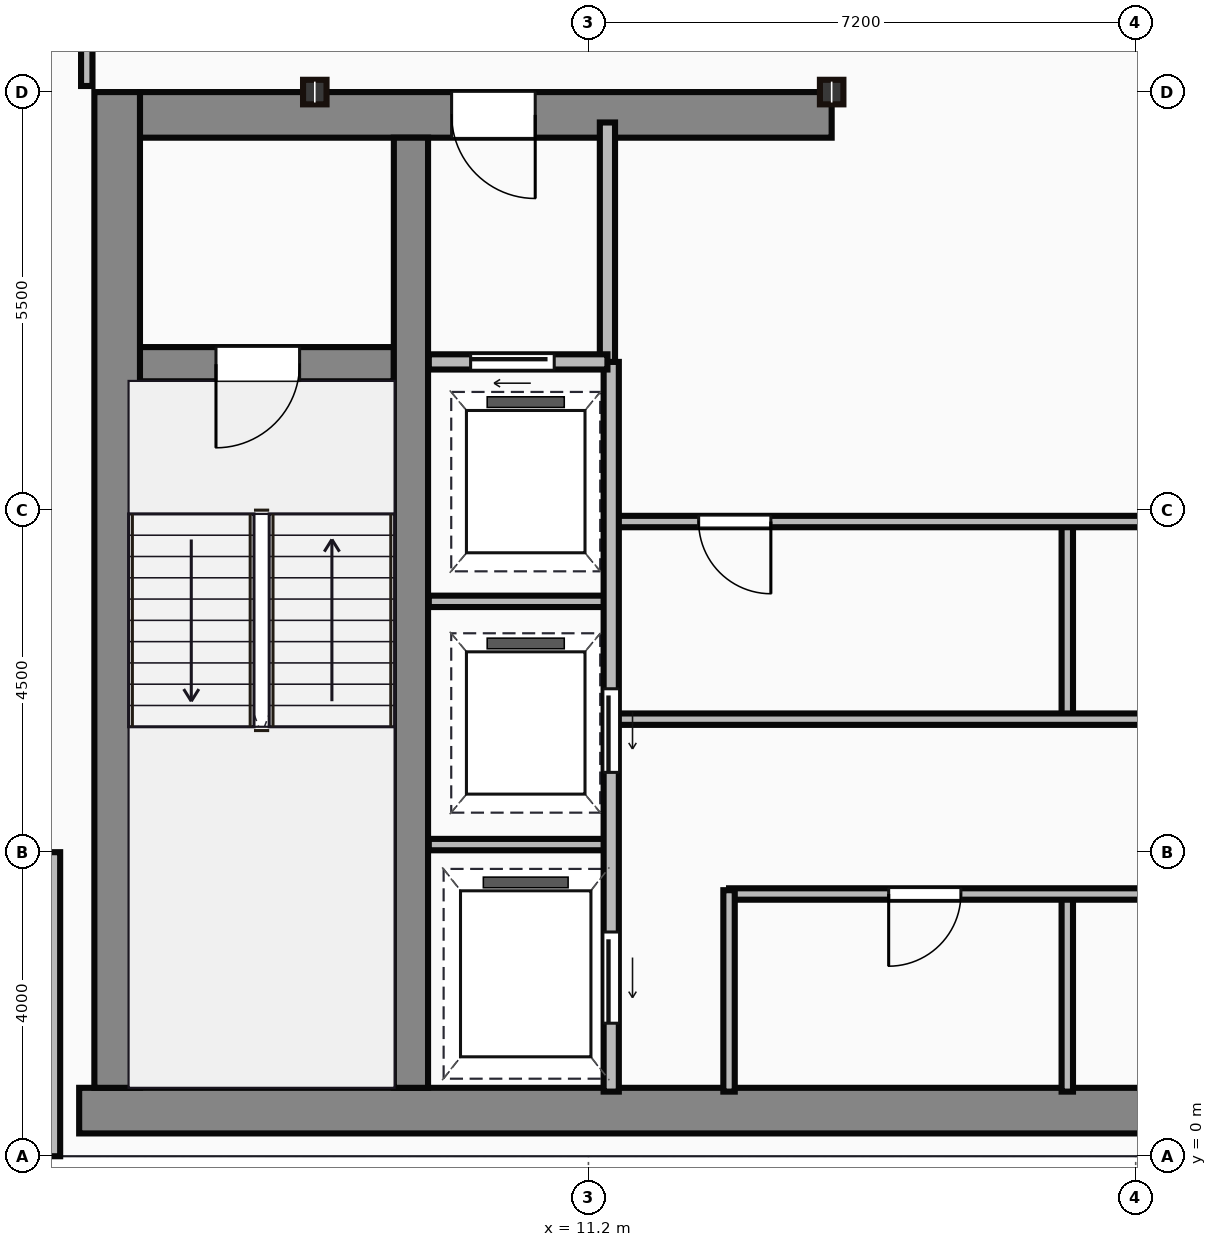
"""IFC4 building model, lengths in metres.
Left out: names, types, materials, properties, quantities, classifications, styles, units other than length and angle.
Written with IfcOpenShell. Run it as: python <this file> out.ifc"""

import sys

from ifc_helpers import new_model, si_unit, direction, frame, frame_2d, origin, origin_2d, place, context, subcontext, project, spatial, rectangle, i_section, extrude, source, transform, mapped, element, fill, save


model = new_model("IFC4")
c1 = context("Model", 3, precision=1e-05, world=origin(), true_north=direction((0.0, 1.0)))
c2 = subcontext(c1, "Body", "Model", "MODEL_VIEW")
j1 = project(units=[si_unit("LENGTHUNIT", "METRE"), si_unit("PLANEANGLEUNIT", "RADIAN")], contexts=[c1])
p1 = place(None, origin())
s1 = spatial("IfcSite", under=j1, at=p1, CompositionType="ELEMENT")
p2 = place(p1, origin())
s2 = spatial("IfcBuilding", under=s1, at=p2, CompositionType="ELEMENT")
p3 = place(p2, frame((0.0, 0.0, 266.1)))
s3 = spatial("IfcBuildingStorey", under=s2, at=p3, CompositionType="ELEMENT", Elevation=266.1)
m1 = source(origin(), c2, "Body", "SweptSolid", [
    extrude(rectangle(XDim=29.5, YDim=0.6, at=frame_2d((14.75, 0.0))), origin(), (0.0, 0.0, 1.0), 3.65),
])
p4 = place(p3, frame((4.5, 0.6, 0.0), z_axis=(0.0, 0.0, 1.0), x_axis=(1.0, 0.0, 0.0)))
e1 = element("IfcWall", 1, at=p4, inside=s3, PredefinedType="SHEAR", context=c2, shape_type="MappedRepresentation", body=[
    mapped(m1, transform((0.0, 0.0, 0.0))),
])
m2 = source(origin(), c2, "Body", "SweptSolid", [
    extrude(rectangle(XDim=13.1, YDim=0.6, at=frame_2d((6.55, 0.0))), origin(), (0.0, 0.0, 1.0), 3.65),
])
p5 = place(p3, frame((5.0, 0.9, 0.0), z_axis=(0.0, 0.0, 1.0), x_axis=(0.0, 1.0, 0.0)))
e2 = element("IfcWall", 2, at=p5, inside=s3, PredefinedType="SHEAR", context=c2, shape_type="MappedRepresentation", body=[
    mapped(m2, transform((0.0, 0.0, 0.0))),
])
m3 = source(origin(), c2, "Body", "SweptSolid", [
    extrude(rectangle(XDim=9.1, YDim=0.6, at=frame_2d((4.55, 0.0))), origin(), (0.0, 0.0, 1.0), 3.65),
])
p6 = place(p3, frame((5.3, 13.7, 0.0), z_axis=(0.0, 0.0, 1.0), x_axis=(1.0, 0.0, 0.0)))
e3 = element("IfcWall", 3, at=p6, inside=s3, PredefinedType="SHEAR", context=c2, shape_type="MappedRepresentation", body=[
    mapped(m3, transform((0.0, 0.0, 0.0))),
])
p7 = place(p6, frame((4.1, 0.0, 0.0)))
e4 = element("IfcOpeningElement", 4, at=p7, cuts=e3, PredefinedType="OPENING", context=c2, shape_type="SweptSolid", body=[
    extrude(rectangle(XDim=1.1, YDim=2.15, at=frame_2d((0.55, 1.075))), frame((0.0, 0.31, 0.0), z_axis=(0.0, -1.0, 0.0), x_axis=(1.0, 0.0, 0.0)), (0.0, 0.0, 1.0), 0.62),
])
m4 = source(origin(), c2, "Body", "SweptSolid", [
    extrude(rectangle(XDim=12.5, YDim=0.45, at=frame_2d((6.25, 0.0))), origin(), (0.0, 0.0, 1.0), 3.65),
])
p8 = place(p3, frame((8.865, 0.9, 0.0), z_axis=(0.0, 0.0, 1.0), x_axis=(0.0, 1.0, 0.0)))
e5 = element("IfcWall", 5, at=p8, inside=s3, PredefinedType="SHEAR", context=c2, shape_type="MappedRepresentation", body=[
    mapped(m4, transform((0.0, 0.0, 0.0))),
])
m5 = source(origin(), c2, "Body", "SweptSolid", [
    extrude(rectangle(XDim=3.39, YDim=0.45, at=frame_2d((1.695, 0.0))), origin(), (0.0, 0.0, 1.0), 3.65),
])
p9 = place(p3, frame((5.25, 10.42, 0.0), z_axis=(0.0, 0.0, 1.0), x_axis=(1.0, 0.0, 0.0)))
e6 = element("IfcWall", 6, at=p9, inside=s3, PredefinedType="SHEAR", context=c2, shape_type="MappedRepresentation", body=[
    mapped(m5, transform((0.0, 0.0, 0.0))),
])
p10 = place(p9, frame((1.05, 0.0, 0.0)))
e7 = element("IfcOpeningElement", 7, at=p10, cuts=e6, PredefinedType="OPENING", context=c2, shape_type="SweptSolid", body=[
    extrude(rectangle(XDim=1.1, YDim=2.15, at=frame_2d((0.55, 1.075))), frame((0.0, 0.235, 0.0), z_axis=(0.0, -1.0, 0.0), x_axis=(1.0, 0.0, 0.0)), (0.0, 0.0, 1.0), 0.47),
])
m6 = source(origin(), c2, "Body", "SweptSolid", [
    extrude(i_section(OverallWidth=0.309, OverallDepth=0.323, WebThickness=0.014, FlangeThickness=0.023, at=origin_2d()), origin(), (0.0, 0.0, 1.0), 3.65),
])
for number, where, z_axis, x_axis in (
    (8, (7.6, 14.0, 0.0), (0.0, 0.0, 1.0), (1.0, 0.0, 0.0)),
    (9, (14.4, 14.0, 0.0), (0.0, 0.0, 1.0), (1.0, 0.0, 0.0)),
):
    element("IfcColumn", number, at=place(p3, frame(where, z_axis=z_axis, x_axis=x_axis)), inside=s3, PredefinedType="COLUMN", context=c2, shape_type="MappedRepresentation", body=[
        mapped(m6, transform((0.0, 0.0, 0.0))),
    ])
m7 = source(origin(), c2, "Body", "SweptSolid", [
    extrude(rectangle(XDim=4.0, YDim=0.25, at=frame_2d((2.0, 0.0))), origin(), (0.0, 0.0, 1.0), 3.4),
])
p11 = place(p3, frame((4.125, 4.0, 0.0), z_axis=(0.0, 0.0, 1.0), x_axis=(0.0, -1.0, 0.0)))
e10 = element("IfcWall", 10, at=p11, inside=s3, PredefinedType="STANDARD", context=c2, shape_type="MappedRepresentation", body=[
    mapped(m7, transform((0.0, 0.0, 0.0))),
])
m8 = source(origin(), c2, "Body", "SweptSolid", [
    extrude(rectangle(XDim=3.18, YDim=0.2, at=frame_2d((1.59, 0.0))), origin(), (0.0, 0.0, 1.0), 3.4),
])
p12 = place(p3, frame((11.45, 10.42, 0.0), z_axis=(0.0, 0.0, 1.0), x_axis=(0.0, 1.0, 0.0)))
e11 = element("IfcWall", 11, at=p12, inside=s3, PredefinedType="PARTITIONING", context=c2, shape_type="MappedRepresentation", body=[
    mapped(m8, transform((0.0, 0.0, 0.0))),
])
m9 = source(origin(), c2, "Body", "SweptSolid", [
    extrude(rectangle(XDim=2.35, YDim=0.2, at=frame_2d((1.175, 0.0))), origin(), (0.0, 0.0, 1.0), 3.4),
])
p13 = place(p3, frame((9.1, 10.45, 0.0), z_axis=(0.0, 0.0, 1.0), x_axis=(1.0, 0.0, 0.0)))
e12 = element("IfcWall", 12, at=p13, inside=s3, PredefinedType="PARTITIONING", context=c2, shape_type="MappedRepresentation", body=[
    mapped(m9, transform((0.0, 0.0, 0.0))),
])
p14 = place(p13, frame((0.55, 0.0, 0.0)))
e13 = element("IfcOpeningElement", 13, at=p14, cuts=e12, PredefinedType="OPENING", context=c2, shape_type="SweptSolid", body=[
    extrude(rectangle(XDim=1.1, YDim=2.15, at=frame_2d((0.55, 1.075))), frame((0.0, 0.11, 0.0), z_axis=(0.0, -1.0, 0.0), x_axis=(1.0, 0.0, 0.0)), (0.0, 0.0, 1.0), 0.22),
])
m10 = source(origin(), c2, "Body", "SweptSolid", [
    extrude(rectangle(XDim=9.6, YDim=0.2, at=frame_2d((4.8, 0.0))), origin(), (0.0, 0.0, 1.0), 3.4),
])
p15 = place(p3, frame((11.5, 0.85, 0.0), z_axis=(0.0, 0.0, 1.0), x_axis=(0.0, 1.0, 0.0)))
e14 = element("IfcWall", 14, at=p15, inside=s3, PredefinedType="PARTITIONING", context=c2, shape_type="MappedRepresentation", body=[
    mapped(m10, transform((0.0, 0.0, 0.0))),
])
p16 = place(p15, frame((4.2, 0.0, 0.0)))
e15 = element("IfcOpeningElement", 15, at=p16, cuts=e14, PredefinedType="OPENING", context=c2, shape_type="SweptSolid", body=[
    extrude(rectangle(XDim=1.1, YDim=2.15, at=frame_2d((0.55, 1.075))), frame((0.0, 0.11, 0.0), z_axis=(0.0, -1.0, 0.0), x_axis=(1.0, 0.0, 0.0)), (0.0, 0.0, 1.0), 0.22),
])
p17 = place(p15, frame((0.9, 0.0, 0.0)))
e16 = element("IfcOpeningElement", 16, at=p17, cuts=e14, PredefinedType="OPENING", context=c2, shape_type="SweptSolid", body=[
    extrude(rectangle(XDim=1.2, YDim=2.15, at=frame_2d((0.6, 1.075))), frame((0.0, 0.11, 0.0), z_axis=(0.0, -1.0, 0.0), x_axis=(1.0, 0.0, 0.0)), (0.0, 0.0, 1.0), 0.22),
])
m11 = source(origin(), c2, "Body", "SweptSolid", [
    extrude(rectangle(XDim=2.4, YDim=0.15, at=frame_2d((1.2, 0.0))), origin(), (0.0, 0.0, 1.0), 3.4),
])
for number, where, z_axis, x_axis in (
    (17, (9.1, 4.1, 0.0), (0.0, 0.0, 1.0), (1.0, 0.0, 0.0)),
    (18, (9.1, 7.3, 0.0), (0.0, 0.0, 1.0), (1.0, 0.0, 0.0)),
):
    element("IfcWall", number, at=place(p3, frame(where, z_axis=z_axis, x_axis=x_axis)), inside=s3, PredefinedType="PARTITIONING", context=c2, shape_type="MappedRepresentation", body=[
        mapped(m11, transform((0.0, 0.0, 0.0))),
    ])
m12 = source(origin(), c2, "Body", "SweptSolid", [
    extrude(rectangle(XDim=2.65, YDim=0.15, at=frame_2d((1.325, 0.0))), origin(), (0.0, 0.0, 1.0), 3.4),
])
p18 = place(p3, frame((13.05, 0.85, 0.0), z_axis=(0.0, 0.0, 1.0), x_axis=(0.0, 1.0, 0.0)))
e19 = element("IfcWall", 19, at=p18, inside=s3, PredefinedType="PARTITIONING", context=c2, shape_type="MappedRepresentation", body=[
    mapped(m12, transform((0.0, 0.0, 0.0))),
])
m13 = source(origin(), c2, "Body", "SweptSolid", [
    extrude(rectangle(XDim=10.35, YDim=0.15, at=frame_2d((5.175, 0.0))), origin(), (0.0, 0.0, 1.0), 3.4),
])
p19 = place(p3, frame((13.05, 3.45, 0.0), z_axis=(0.0, 0.0, 1.0), x_axis=(1.0, 0.0, 0.0)))
e20 = element("IfcWall", 20, at=p19, inside=s3, PredefinedType="PARTITIONING", context=c2, shape_type="MappedRepresentation", body=[
    mapped(m13, transform((0.0, 0.0, 0.0))),
])
p20 = place(p19, frame((2.1, 0.0, 0.0)))
e21 = element("IfcOpeningElement", 21, at=p20, cuts=e20, PredefinedType="OPENING", context=c2, shape_type="SweptSolid", body=[
    extrude(rectangle(XDim=0.95, YDim=2.15, at=frame_2d((0.475, 1.075))), frame((0.0, 0.085, 0.0), z_axis=(0.0, -1.0, 0.0), x_axis=(1.0, 0.0, 0.0)), (0.0, 0.0, 1.0), 0.17),
])
p21 = place(p19, frame((6.8, 0.0, 0.0)))
e22 = element("IfcOpeningElement", 22, at=p21, cuts=e20, PredefinedType="OPENING", context=c2, shape_type="SweptSolid", body=[
    extrude(rectangle(XDim=0.95, YDim=2.15, at=frame_2d((0.475, 1.075))), frame((0.0, 0.085, 0.0), z_axis=(0.0, -1.0, 0.0), x_axis=(1.0, 0.0, 0.0)), (0.0, 0.0, 1.0), 0.17),
])
m14 = source(origin(), c2, "Body", "SweptSolid", [
    extrude(rectangle(XDim=2.6, YDim=0.15, at=frame_2d((1.3, 0.0))), origin(), (0.0, 0.0, 1.0), 3.4),
])
p22 = place(p3, frame((17.5, 0.85, 0.0), z_axis=(0.0, 0.0, 1.0), x_axis=(0.0, 1.0, 0.0)))
e23 = element("IfcWall", 23, at=p22, inside=s3, PredefinedType="PARTITIONING", context=c2, shape_type="MappedRepresentation", body=[
    mapped(m14, transform((0.0, 0.0, 0.0))),
])
m15 = source(origin(), c2, "Body", "SweptSolid", [
    extrude(rectangle(XDim=11.85, YDim=0.15, at=frame_2d((5.925, 0.0))), origin(), (0.0, 0.0, 1.0), 3.4),
])
p23 = place(p3, frame((11.55, 5.75, 0.0), z_axis=(0.0, 0.0, 1.0), x_axis=(1.0, 0.0, 0.0)))
e24 = element("IfcWall", 24, at=p23, inside=s3, PredefinedType="PARTITIONING", context=c2, shape_type="MappedRepresentation", body=[
    mapped(m15, transform((0.0, 0.0, 0.0))),
])
p24 = place(p3, frame((11.55, 8.35, 0.0), z_axis=(0.0, 0.0, 1.0), x_axis=(1.0, 0.0, 0.0)))
e25 = element("IfcWall", 25, at=p24, inside=s3, PredefinedType="PARTITIONING", context=c2, shape_type="MappedRepresentation", body=[
    mapped(m15, transform((0.0, 0.0, 0.0))),
])
p25 = place(p24, frame((1.1, 0.0, 0.0)))
e26 = element("IfcOpeningElement", 26, at=p25, cuts=e25, PredefinedType="OPENING", context=c2, shape_type="SweptSolid", body=[
    extrude(rectangle(XDim=0.95, YDim=2.15, at=frame_2d((0.475, 1.075))), frame((0.0, 0.085, 0.0), z_axis=(0.0, -1.0, 0.0), x_axis=(1.0, 0.0, 0.0)), (0.0, 0.0, 1.0), 0.17),
])
p26 = place(p24, frame((9.4, 0.0, 0.0)))
e27 = element("IfcOpeningElement", 27, at=p26, cuts=e25, PredefinedType="OPENING", context=c2, shape_type="SweptSolid", body=[
    extrude(rectangle(XDim=0.95, YDim=2.15, at=frame_2d((0.475, 1.075))), frame((0.0, 0.085, 0.0), z_axis=(0.0, -1.0, 0.0), x_axis=(1.0, 0.0, 0.0)), (0.0, 0.0, 1.0), 0.17),
])
m16 = source(origin(), c2, "Body", "SweptSolid", [
    extrude(rectangle(XDim=2.5, YDim=0.15, at=frame_2d((1.25, 0.0))), origin(), (0.0, 0.0, 1.0), 3.4),
])
p27 = place(p3, frame((17.5, 5.8, 0.0), z_axis=(0.0, 0.0, 1.0), x_axis=(0.0, 1.0, 0.0)))
e28 = element("IfcWall", 28, at=p27, inside=s3, PredefinedType="PARTITIONING", context=c2, shape_type="MappedRepresentation", body=[
    mapped(m16, transform((0.0, 0.0, 0.0))),
])
m17 = source(origin(), c2, "Body", "SweptSolid", [
    extrude(rectangle(XDim=2.12, YDim=0.15, at=frame_2d((1.06, 0.0))), origin(), (0.0, 0.0, 1.0), 3.4),
])
p28 = place(p3, frame((4.6, 14.08, 0.0), z_axis=(0.0, 0.0, 1.0), x_axis=(0.0, 1.0, 0.0)))
e29 = element("IfcWall", 29, at=p28, inside=s3, PredefinedType="PARTITIONING", context=c2, shape_type="MappedRepresentation", body=[
    mapped(m17, transform((0.0, 0.0, 0.0))),
])
m18 = source(origin(), c2, "Body", "SweptSolid", [
    extrude(rectangle(XDim=1.1, YDim=2.15, at=frame_2d((0.55, 1.075))), frame((0.0, 0.025, 0.0), z_axis=(0.0, -1.0, 0.0), x_axis=(1.0, 0.0, 0.0)), (0.0, 0.0, 1.0), 0.05),
])
p29 = place(p10, frame((1.1, 0.0, 0.0), z_axis=(0.0, 0.0, 1.0), x_axis=(-1.0, 0.0, 0.0)))
e30 = element("IfcDoor", 30, at=p29, inside=s3, OperationType="SINGLE_SWING_LEFT", PredefinedType="DOOR", context=c2, shape_type="MappedRepresentation", body=[
    mapped(m18, transform((0.0, 0.0, 0.0))),
])
fill(e7, e30)
p30 = place(p7, origin())
e31 = element("IfcDoor", 31, at=p30, inside=s3, OperationType="SINGLE_SWING_RIGHT", PredefinedType="DOOR", context=c2, shape_type="MappedRepresentation", body=[
    mapped(m18, transform((0.0, 0.0, 0.0))),
])
fill(e4, e31)
p31 = place(p14, origin())
e32 = element("IfcDoor", 32, at=p31, inside=s3, OperationType="SLIDING_TO_LEFT", PredefinedType="DOOR", context=c2, shape_type="MappedRepresentation", body=[
    mapped(m18, transform((0.0, 0.0, 0.0))),
])
fill(e13, e32)
p32 = place(p16, frame((1.1, 0.0, 0.0), z_axis=(0.0, 0.0, 1.0), x_axis=(-1.0, 0.0, 0.0)))
e33 = element("IfcDoor", 33, at=p32, inside=s3, OperationType="SLIDING_TO_LEFT", PredefinedType="DOOR", context=c2, shape_type="MappedRepresentation", body=[
    mapped(m18, transform((0.0, 0.0, 0.0))),
])
fill(e15, e33)
m19 = source(origin(), c2, "Body", "SweptSolid", [
    extrude(rectangle(XDim=1.2, YDim=2.15, at=frame_2d((0.6, 1.075))), frame((0.0, 0.025, 0.0), z_axis=(0.0, -1.0, 0.0), x_axis=(1.0, 0.0, 0.0)), (0.0, 0.0, 1.0), 0.05),
])
p33 = place(p17, frame((1.2, 0.0, 0.0), z_axis=(0.0, 0.0, 1.0), x_axis=(-1.0, 0.0, 0.0)))
e34 = element("IfcDoor", 34, at=p33, inside=s3, OperationType="SLIDING_TO_LEFT", PredefinedType="DOOR", context=c2, shape_type="MappedRepresentation", body=[
    mapped(m19, transform((0.0, 0.0, 0.0))),
])
fill(e16, e34)
m20 = source(origin(), c2, "Body", "SweptSolid", [
    extrude(rectangle(XDim=0.95, YDim=2.15, at=frame_2d((0.475, 1.075))), frame((0.0, 0.025, 0.0), z_axis=(0.0, -1.0, 0.0), x_axis=(1.0, 0.0, 0.0)), (0.0, 0.0, 1.0), 0.05),
])
p34 = place(p20, origin())
e35 = element("IfcDoor", 35, at=p34, inside=s3, OperationType="SINGLE_SWING_LEFT", PredefinedType="DOOR", context=c2, shape_type="MappedRepresentation", body=[
    mapped(m20, transform((0.0, 0.0, 0.0))),
])
fill(e21, e35)
p35 = place(p25, origin())
e36 = element("IfcDoor", 36, at=p35, inside=s3, OperationType="SINGLE_SWING_RIGHT", PredefinedType="DOOR", context=c2, shape_type="MappedRepresentation", body=[
    mapped(m20, transform((0.0, 0.0, 0.0))),
])
fill(e26, e36)
save(model, sys.argv[1])
